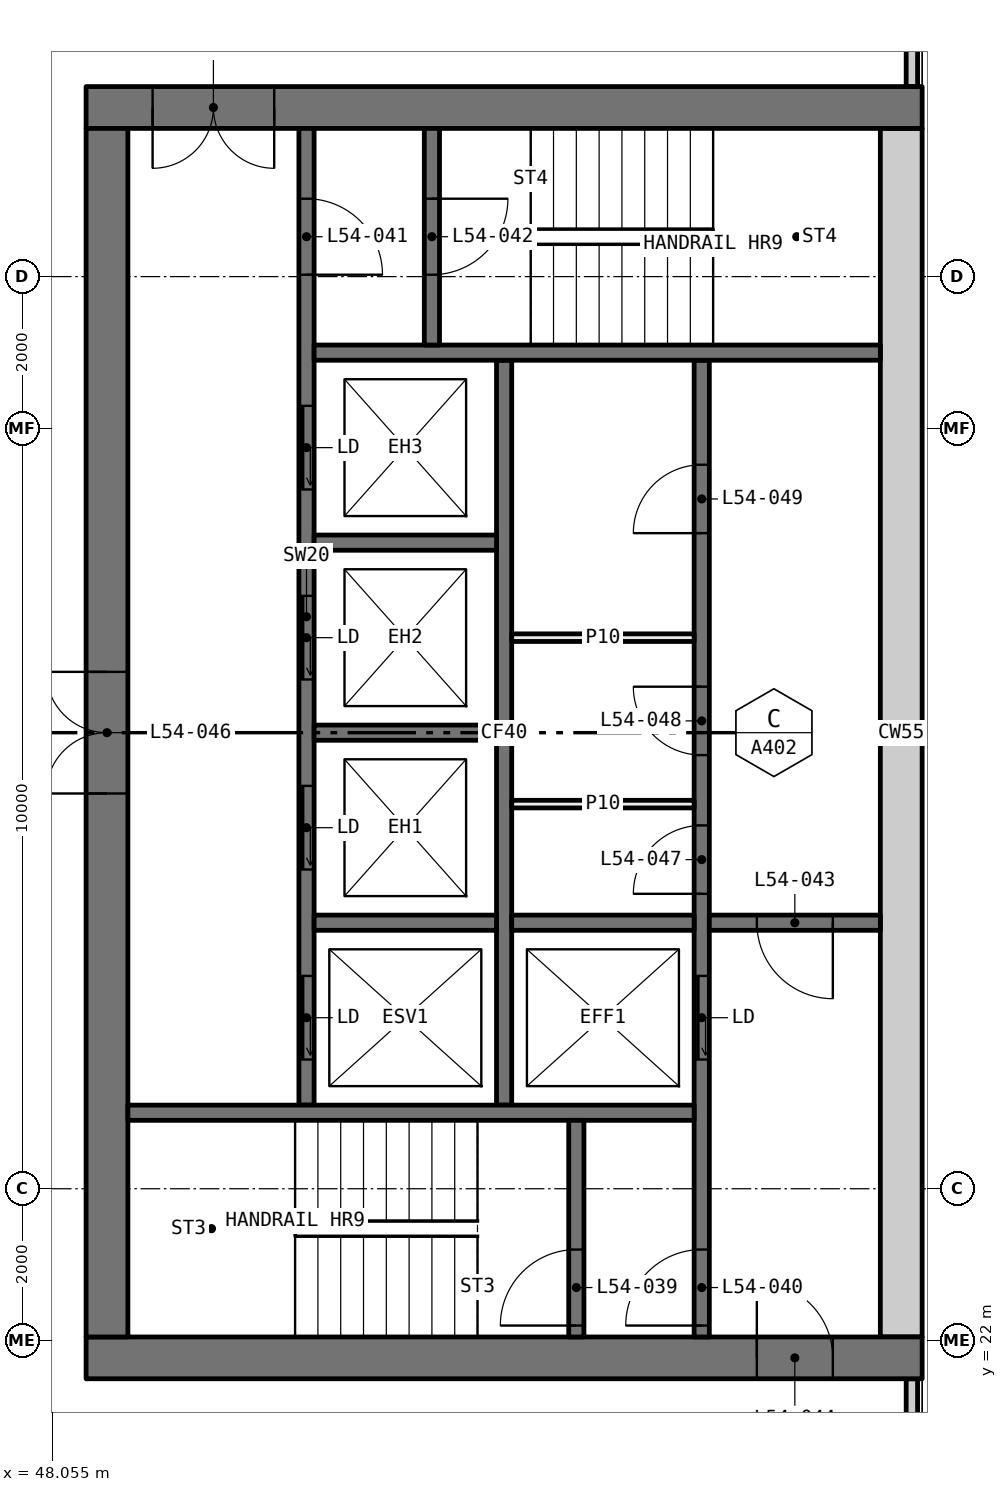
"""IFC4 building model, lengths in metres.
Left out: names, types, materials, properties, quantities, classifications, styles, units other than length and angle.
Written with IfcOpenShell. Run it as: python <this file> out.ifc"""

import sys

from ifc_helpers import new_model, si_unit, direction, frame, frame_2d, origin, place, context, subcontext, project, spatial, rectangle, extrude, element, fill, save


model = new_model("IFC4")
c1 = context("Model", 3, precision=1e-05, world=origin(), true_north=direction((0.0, 1.0)))
c2 = subcontext(c1, "Body", "Model", "MODEL_VIEW")
j1 = project(units=[si_unit("LENGTHUNIT", "METRE"), si_unit("PLANEANGLEUNIT", "RADIAN")], contexts=[c1])
p1 = place(None, origin())
s1 = spatial("IfcSite", under=j1, at=p1, CompositionType="ELEMENT")
p2 = place(p1, origin())
s2 = spatial("IfcBuilding", under=s1, at=p2, CompositionType="ELEMENT")
p3 = place(p2, frame((0.0, 0.0, 203.1)))
s3 = spatial("IfcBuildingStorey", under=s2, at=p3, CompositionType="ELEMENT", Elevation=203.1)
for number, where, z_axis, x_axis in (
    (1, (59.365, 18.71, 0.0), (0.0, 0.0, 1.0), (0.0, 1.0, 0.0)),
    (2, (59.365, 38.5, 0.0), (0.0, 0.0, 1.0), (0.0, 1.0, 0.0)),
):
    element("IfcWall", number, at=place(p3, frame(where, z_axis=z_axis, x_axis=x_axis)), inside=s3, PredefinedType="ELEMENTEDWALL", context=c2, shape_type="SweptSolid", body=[
        extrude(rectangle(XDim=2.79, YDim=0.15, at=frame_2d((1.395, 0.0))), origin(), (0.0, 0.0, 1.0), 3.05),
    ])
p4 = place(p3, frame((59.5, 21.775, 0.0), z_axis=(0.0, 0.0, 1.0), x_axis=(-1.0, 0.0, 0.0)))
e3 = element("IfcWall", 3, at=p4, inside=s3, PredefinedType="SHEAR", context=c2, shape_type="SweptSolid", body=[
    extrude(rectangle(XDim=11.0, YDim=0.55, at=frame_2d((5.5, 0.0))), origin(), (0.0, 0.0, 1.0), 3.05),
])
p5 = place(p4, frame((1.175, 0.0, 0.0)))
e4 = element("IfcOpeningElement", 4, at=p5, cuts=e3, PredefinedType="OPENING", context=c2, shape_type="SweptSolid", body=[
    extrude(rectangle(XDim=1.0, YDim=2.1, at=frame_2d((0.5, 1.05))), frame((0.0, 0.285, 0.0), z_axis=(0.0, -1.0, 0.0), x_axis=(1.0, 0.0, 0.0)), (0.0, 0.0, 1.0), 0.57),
])
p6 = place(p3, frame((59.5, 38.225, 0.0), z_axis=(0.0, 0.0, 1.0), x_axis=(-1.0, 0.0, 0.0)))
e5 = element("IfcWall", 5, at=p6, inside=s3, PredefinedType="SHEAR", context=c2, shape_type="SweptSolid", body=[
    extrude(rectangle(XDim=11.0, YDim=0.55, at=frame_2d((5.5, 0.0))), origin(), (0.0, 0.0, 1.0), 3.05),
])
p7 = place(p6, frame((8.525, 0.0, 0.0)))
e6 = element("IfcOpeningElement", 6, at=p7, cuts=e5, PredefinedType="OPENING", context=c2, shape_type="SweptSolid", body=[
    extrude(rectangle(XDim=1.6, YDim=2.1, at=frame_2d((0.8, 1.05))), frame((0.0, 0.285, 0.0), z_axis=(0.0, -1.0, 0.0), x_axis=(1.0, 0.0, 0.0)), (0.0, 0.0, 1.0), 0.57),
])
p8 = place(p3, frame((59.225, 22.05, 0.0), z_axis=(0.0, 0.0, 1.0), x_axis=(0.0, 1.0, 0.0)))
e7 = element("IfcWall", 7, at=p8, inside=s3, PredefinedType="SHEAR", context=c2, shape_type="SweptSolid", body=[
    extrude(rectangle(XDim=15.9, YDim=0.55, at=frame_2d((7.95, 0.0))), origin(), (0.0, 0.0, 1.0), 3.05),
])
p9 = place(p3, frame((48.775, 22.05, 0.0), z_axis=(0.0, 0.0, 1.0), x_axis=(0.0, 1.0, 0.0)))
e8 = element("IfcWall", 8, at=p9, inside=s3, PredefinedType="SHEAR", context=c2, shape_type="SweptSolid", body=[
    extrude(rectangle(XDim=15.9, YDim=0.55, at=frame_2d((7.95, 0.0))), origin(), (0.0, 0.0, 1.0), 3.05),
])
p10 = place(p9, frame((7.15, 0.0, 0.0)))
e9 = element("IfcOpeningElement", 9, at=p10, cuts=e8, PredefinedType="OPENING", context=c2, shape_type="SweptSolid", body=[
    extrude(rectangle(XDim=1.6, YDim=2.1, at=frame_2d((0.8, 1.05))), frame((0.0, 0.285, 0.0), z_axis=(0.0, -1.0, 0.0), x_axis=(1.0, 0.0, 0.0)), (0.0, 0.0, 1.0), 0.57),
])
p11 = place(p3, frame((56.6, 22.05, 0.0), z_axis=(0.0, 0.0, 1.0), x_axis=(0.0, 1.0, 0.0)))
e10 = element("IfcWall", 10, at=p11, inside=s3, PredefinedType="SOLIDWALL", context=c2, shape_type="SweptSolid", body=[
    extrude(rectangle(XDim=12.85, YDim=0.2, at=frame_2d((6.425, 0.0))), origin(), (0.0, 0.0, 1.0), 3.05),
])
p12 = place(p11, frame((3.65, 0.0, 0.0)))
e11 = element("IfcOpeningElement", 11, at=p12, cuts=e10, PredefinedType="OPENING", context=c2, shape_type="SweptSolid", body=[
    extrude(rectangle(XDim=1.1, YDim=2.1, at=frame_2d((0.55, 1.05))), frame((0.0, 0.11, 0.0), z_axis=(0.0, -1.0, 0.0), x_axis=(1.0, 0.0, 0.0)), (0.0, 0.0, 1.0), 0.22),
])
p13 = place(p11, frame((0.15, 0.0, 0.0)))
e12 = element("IfcOpeningElement", 12, at=p13, cuts=e10, PredefinedType="OPENING", context=c2, shape_type="SweptSolid", body=[
    extrude(rectangle(XDim=1.0, YDim=2.1, at=frame_2d((0.5, 1.05))), frame((0.0, 0.11, 0.0), z_axis=(0.0, -1.0, 0.0), x_axis=(1.0, 0.0, 0.0)), (0.0, 0.0, 1.0), 0.22),
])
p14 = place(p11, frame((5.83, 0.0, 0.0)))
e13 = element("IfcOpeningElement", 13, at=p14, cuts=e10, PredefinedType="OPENING", context=c2, shape_type="SweptSolid", body=[
    extrude(rectangle(XDim=0.9, YDim=2.1, at=frame_2d((0.45, 1.05))), frame((0.0, 0.11, 0.0), z_axis=(0.0, -1.0, 0.0), x_axis=(1.0, 0.0, 0.0)), (0.0, 0.0, 1.0), 0.22),
])
p15 = place(p11, frame((7.655, 0.0, 0.0)))
e14 = element("IfcOpeningElement", 14, at=p15, cuts=e10, PredefinedType="OPENING", context=c2, shape_type="SweptSolid", body=[
    extrude(rectangle(XDim=0.9, YDim=2.1, at=frame_2d((0.45, 1.05))), frame((0.0, 0.11, 0.0), z_axis=(0.0, -1.0, 0.0), x_axis=(1.0, 0.0, 0.0)), (0.0, 0.0, 1.0), 0.22),
])
p16 = place(p11, frame((10.575, 0.0, 0.0)))
e15 = element("IfcOpeningElement", 15, at=p16, cuts=e10, PredefinedType="OPENING", context=c2, shape_type="SweptSolid", body=[
    extrude(rectangle(XDim=0.9, YDim=2.1, at=frame_2d((0.45, 1.05))), frame((0.0, 0.11, 0.0), z_axis=(0.0, -1.0, 0.0), x_axis=(1.0, 0.0, 0.0)), (0.0, 0.0, 1.0), 0.22),
])
p17 = place(p3, frame((51.4, 25.1, 0.0), z_axis=(0.0, 0.0, 1.0), x_axis=(0.0, 1.0, 0.0)))
e16 = element("IfcWall", 16, at=p17, inside=s3, PredefinedType="SOLIDWALL", context=c2, shape_type="SweptSolid", body=[
    extrude(rectangle(XDim=12.85, YDim=0.2, at=frame_2d((6.425, 0.0))), origin(), (0.0, 0.0, 1.0), 3.05),
])
p18 = place(p17, frame((0.6, 0.0, 0.0)))
e17 = element("IfcOpeningElement", 17, at=p18, cuts=e16, PredefinedType="OPENING", context=c2, shape_type="SweptSolid", body=[
    extrude(rectangle(XDim=1.1, YDim=2.1, at=frame_2d((0.55, 1.05))), frame((0.0, 0.11, 0.0), z_axis=(0.0, -1.0, 0.0), x_axis=(1.0, 0.0, 0.0)), (0.0, 0.0, 1.0), 0.22),
])
p19 = place(p17, frame((3.1, 0.0, 0.0)))
e18 = element("IfcOpeningElement", 18, at=p19, cuts=e16, PredefinedType="OPENING", context=c2, shape_type="SweptSolid", body=[
    extrude(rectangle(XDim=1.1, YDim=2.1, at=frame_2d((0.55, 1.05))), frame((0.0, 0.11, 0.0), z_axis=(0.0, -1.0, 0.0), x_axis=(1.0, 0.0, 0.0)), (0.0, 0.0, 1.0), 0.22),
])
p20 = place(p17, frame((5.6, 0.0, 0.0)))
e19 = element("IfcOpeningElement", 19, at=p20, cuts=e16, PredefinedType="OPENING", context=c2, shape_type="SweptSolid", body=[
    extrude(rectangle(XDim=1.1, YDim=2.1, at=frame_2d((0.55, 1.05))), frame((0.0, 0.11, 0.0), z_axis=(0.0, -1.0, 0.0), x_axis=(1.0, 0.0, 0.0)), (0.0, 0.0, 1.0), 0.22),
])
p21 = place(p17, frame((8.1, 0.0, 0.0)))
e20 = element("IfcOpeningElement", 20, at=p21, cuts=e16, PredefinedType="OPENING", context=c2, shape_type="SweptSolid", body=[
    extrude(rectangle(XDim=1.1, YDim=2.1, at=frame_2d((0.55, 1.05))), frame((0.0, 0.11, 0.0), z_axis=(0.0, -1.0, 0.0), x_axis=(1.0, 0.0, 0.0)), (0.0, 0.0, 1.0), 0.22),
])
p22 = place(p17, frame((10.925, 0.0, 0.0)))
e21 = element("IfcOpeningElement", 21, at=p22, cuts=e16, PredefinedType="OPENING", context=c2, shape_type="SweptSolid", body=[
    extrude(rectangle(XDim=1.0, YDim=2.1, at=frame_2d((0.5, 1.05))), frame((0.0, 0.11, 0.0), z_axis=(0.0, -1.0, 0.0), x_axis=(1.0, 0.0, 0.0)), (0.0, 0.0, 1.0), 0.22),
])
p23 = place(p3, frame((54.0, 25.1, 0.0), z_axis=(0.0, 0.0, 1.0), x_axis=(0.0, 1.0, 0.0)))
e22 = element("IfcWall", 22, at=p23, inside=s3, PredefinedType="SOLIDWALL", context=c2, shape_type="SweptSolid", body=[
    extrude(rectangle(XDim=9.8, YDim=0.2, at=frame_2d((4.9, 0.0))), origin(), (0.0, 0.0, 1.0), 3.05),
])
for number, where, z_axis, x_axis in (
    (23, (56.5, 25.0, 0.0), (0.0, 0.0, 1.0), (-1.0, 0.0, 0.0)),
    (24, (58.95, 35.0, 0.0), (0.0, 0.0, 1.0), (-1.0, 0.0, 0.0)),
):
    element("IfcWall", number, at=place(p3, frame(where, z_axis=z_axis, x_axis=x_axis)), inside=s3, PredefinedType="SOLIDWALL", context=c2, shape_type="SweptSolid", body=[
        extrude(rectangle(XDim=7.45, YDim=0.2, at=frame_2d((3.725, 0.0))), origin(), (0.0, 0.0, 1.0), 3.05),
    ])
p24 = place(p3, frame((58.95, 27.5, 0.0), z_axis=(0.0, 0.0, 1.0), x_axis=(-1.0, 0.0, 0.0)))
e25 = element("IfcWall", 25, at=p24, inside=s3, PredefinedType="SOLIDWALL", context=c2, shape_type="SweptSolid", body=[
    extrude(rectangle(XDim=2.25, YDim=0.2, at=frame_2d((1.125, 0.0))), origin(), (0.0, 0.0, 1.0), 3.05),
])
p25 = place(p24, frame((0.625, 0.0, 0.0)))
e26 = element("IfcOpeningElement", 26, at=p25, cuts=e25, PredefinedType="OPENING", context=c2, shape_type="SweptSolid", body=[
    extrude(rectangle(XDim=1.0, YDim=2.1, at=frame_2d((0.5, 1.05))), frame((0.0, 0.11, 0.0), z_axis=(0.0, -1.0, 0.0), x_axis=(1.0, 0.0, 0.0)), (0.0, 0.0, 1.0), 0.22),
])
p26 = place(p3, frame((54.95, 22.05, 0.0), z_axis=(0.0, 0.0, 1.0), x_axis=(0.0, 1.0, 0.0)))
e27 = element("IfcWall", 27, at=p26, inside=s3, PredefinedType="SOLIDWALL", context=c2, shape_type="SweptSolid", body=[
    extrude(rectangle(XDim=2.85, YDim=0.2, at=frame_2d((1.425, 0.0))), origin(), (0.0, 0.0, 1.0), 3.05),
])
p27 = place(p26, frame((0.15, 0.0, 0.0)))
e28 = element("IfcOpeningElement", 28, at=p27, cuts=e27, PredefinedType="OPENING", context=c2, shape_type="SweptSolid", body=[
    extrude(rectangle(XDim=1.0, YDim=2.1, at=frame_2d((0.5, 1.05))), frame((0.0, 0.11, 0.0), z_axis=(0.0, -1.0, 0.0), x_axis=(1.0, 0.0, 0.0)), (0.0, 0.0, 1.0), 0.22),
])
p28 = place(p3, frame((53.05, 35.1, 0.0), z_axis=(0.0, 0.0, 1.0), x_axis=(0.0, 1.0, 0.0)))
e29 = element("IfcWall", 29, at=p28, inside=s3, PredefinedType="SOLIDWALL", context=c2, shape_type="SweptSolid", body=[
    extrude(rectangle(XDim=2.85, YDim=0.2, at=frame_2d((1.425, 0.0))), origin(), (0.0, 0.0, 1.0), 3.05),
])
p29 = place(p28, frame((0.925, 0.0, 0.0)))
e30 = element("IfcOpeningElement", 30, at=p29, cuts=e29, PredefinedType="OPENING", context=c2, shape_type="SweptSolid", body=[
    extrude(rectangle(XDim=1.0, YDim=2.1, at=frame_2d((0.5, 1.05))), frame((0.0, 0.11, 0.0), z_axis=(0.0, -1.0, 0.0), x_axis=(1.0, 0.0, 0.0)), (0.0, 0.0, 1.0), 0.22),
])
for number, where, z_axis, x_axis in (
    (31, (56.5, 27.5, 0.0), (0.0, 0.0, 1.0), (-1.0, 0.0, 0.0)),
    (32, (53.9, 27.5, 0.0), (0.0, 0.0, 1.0), (-1.0, 0.0, 0.0)),
    (33, (53.9, 30.0, 0.0), (0.0, 0.0, 1.0), (-1.0, 0.0, 0.0)),
    (34, (53.9, 32.5, 0.0), (0.0, 0.0, 1.0), (-1.0, 0.0, 0.0)),
):
    element("IfcWall", number, at=place(p3, frame(where, z_axis=z_axis, x_axis=x_axis)), inside=s3, PredefinedType="SOLIDWALL", context=c2, shape_type="SweptSolid", body=[
        extrude(rectangle(XDim=2.4, YDim=0.2, at=frame_2d((1.2, 0.0))), origin(), (0.0, 0.0, 1.0), 3.05),
    ])
for number, where, z_axis, x_axis in (
    (35, (56.5, 29.06, 0.0), (0.0, 0.0, 1.0), (-1.0, 0.0, 0.0)),
    (36, (56.5, 31.25, 0.0), (0.0, 0.0, 1.0), (-1.0, 0.0, 0.0)),
):
    element("IfcWall", number, at=place(p3, frame(where, z_axis=z_axis, x_axis=x_axis)), inside=s3, PredefinedType="PARTITIONING", context=c2, shape_type="SweptSolid", body=[
        extrude(rectangle(XDim=2.4, YDim=0.1, at=frame_2d((1.2, 0.0))), origin(), (0.0, 0.0, 1.0), 3.05),
    ])
p30 = place(p18, origin())
e37 = element("IfcDoor", 37, at=p30, inside=s3, OperationType="SLIDING_TO_LEFT", PredefinedType="DOOR", context=c2, shape_type="SweptSolid", body=[
    extrude(rectangle(XDim=1.1, YDim=2.1, at=frame_2d((0.55, 1.05))), frame((0.0, 0.025, 0.0), z_axis=(0.0, -1.0, 0.0), x_axis=(1.0, 0.0, 0.0)), (0.0, 0.0, 1.0), 0.05),
])
fill(e17, e37)
p31 = place(p19, origin())
e38 = element("IfcDoor", 38, at=p31, inside=s3, OperationType="SLIDING_TO_LEFT", PredefinedType="DOOR", context=c2, shape_type="SweptSolid", body=[
    extrude(rectangle(XDim=1.1, YDim=2.1, at=frame_2d((0.55, 1.05))), frame((0.0, 0.025, 0.0), z_axis=(0.0, -1.0, 0.0), x_axis=(1.0, 0.0, 0.0)), (0.0, 0.0, 1.0), 0.05),
])
fill(e18, e38)
p32 = place(p20, origin())
e39 = element("IfcDoor", 39, at=p32, inside=s3, OperationType="SLIDING_TO_LEFT", PredefinedType="DOOR", context=c2, shape_type="SweptSolid", body=[
    extrude(rectangle(XDim=1.1, YDim=2.1, at=frame_2d((0.55, 1.05))), frame((0.0, 0.025, 0.0), z_axis=(0.0, -1.0, 0.0), x_axis=(1.0, 0.0, 0.0)), (0.0, 0.0, 1.0), 0.05),
])
fill(e19, e39)
p33 = place(p21, origin())
e40 = element("IfcDoor", 40, at=p33, inside=s3, OperationType="SLIDING_TO_LEFT", PredefinedType="DOOR", context=c2, shape_type="SweptSolid", body=[
    extrude(rectangle(XDim=1.1, YDim=2.1, at=frame_2d((0.55, 1.05))), frame((0.0, 0.025, 0.0), z_axis=(0.0, -1.0, 0.0), x_axis=(1.0, 0.0, 0.0)), (0.0, 0.0, 1.0), 0.05),
])
fill(e20, e40)
p34 = place(p12, origin())
e41 = element("IfcDoor", 41, at=p34, inside=s3, OperationType="SLIDING_TO_LEFT", PredefinedType="DOOR", context=c2, shape_type="SweptSolid", body=[
    extrude(rectangle(XDim=1.1, YDim=2.1, at=frame_2d((0.55, 1.05))), frame((0.0, 0.025, 0.0), z_axis=(0.0, -1.0, 0.0), x_axis=(1.0, 0.0, 0.0)), (0.0, 0.0, 1.0), 0.05),
])
fill(e11, e41)
p35 = place(p27, origin())
e42 = element("IfcDoor", 42, at=p35, inside=s3, OperationType="SINGLE_SWING_RIGHT", PredefinedType="DOOR", context=c2, shape_type="SweptSolid", body=[
    extrude(rectangle(XDim=1.0, YDim=2.1, at=frame_2d((0.5, 1.05))), frame((0.0, 0.025, 0.0), z_axis=(0.0, -1.0, 0.0), x_axis=(1.0, 0.0, 0.0)), (0.0, 0.0, 1.0), 0.05),
])
fill(e28, e42)
p36 = place(p13, origin())
e43 = element("IfcDoor", 43, at=p36, inside=s3, OperationType="SINGLE_SWING_RIGHT", PredefinedType="DOOR", context=c2, shape_type="SweptSolid", body=[
    extrude(rectangle(XDim=1.0, YDim=2.1, at=frame_2d((0.5, 1.05))), frame((0.0, 0.025, 0.0), z_axis=(0.0, -1.0, 0.0), x_axis=(1.0, 0.0, 0.0)), (0.0, 0.0, 1.0), 0.05),
])
fill(e12, e43)
p37 = place(p22, frame((1.0, 0.0, 0.0), x_axis=(-1.0, 0.0, 0.0)))
e44 = element("IfcDoor", 44, at=p37, inside=s3, OperationType="SINGLE_SWING_LEFT", PredefinedType="DOOR", context=c2, shape_type="SweptSolid", body=[
    extrude(rectangle(XDim=1.0, YDim=2.1, at=frame_2d((0.5, 1.05))), frame((0.0, 0.025, 0.0), z_axis=(0.0, -1.0, 0.0), x_axis=(1.0, 0.0, 0.0)), (0.0, 0.0, 1.0), 0.05),
])
fill(e21, e44)
p38 = place(p29, frame((1.0, 0.0, 0.0), x_axis=(-1.0, 0.0, 0.0)))
e45 = element("IfcDoor", 45, at=p38, inside=s3, OperationType="SINGLE_SWING_RIGHT", PredefinedType="DOOR", context=c2, shape_type="SweptSolid", body=[
    extrude(rectangle(XDim=1.0, YDim=2.1, at=frame_2d((0.5, 1.05))), frame((0.0, 0.025, 0.0), z_axis=(0.0, -1.0, 0.0), x_axis=(1.0, 0.0, 0.0)), (0.0, 0.0, 1.0), 0.05),
])
fill(e30, e45)
p39 = place(p25, origin())
e46 = element("IfcDoor", 46, at=p39, inside=s3, OperationType="SINGLE_SWING_RIGHT", PredefinedType="DOOR", context=c2, shape_type="SweptSolid", body=[
    extrude(rectangle(XDim=1.0, YDim=2.1, at=frame_2d((0.5, 1.05))), frame((0.0, 0.025, 0.0), z_axis=(0.0, -1.0, 0.0), x_axis=(1.0, 0.0, 0.0)), (0.0, 0.0, 1.0), 0.05),
])
fill(e26, e46)
p40 = place(p5, frame((1.0, 0.0, 0.0), x_axis=(-1.0, 0.0, 0.0)))
e47 = element("IfcDoor", 47, at=p40, inside=s3, OperationType="SINGLE_SWING_RIGHT", PredefinedType="DOOR", context=c2, shape_type="SweptSolid", body=[
    extrude(rectangle(XDim=1.0, YDim=2.1, at=frame_2d((0.5, 1.05))), frame((0.0, 0.025, 0.0), z_axis=(0.0, -1.0, 0.0), x_axis=(1.0, 0.0, 0.0)), (0.0, 0.0, 1.0), 0.05),
])
fill(e4, e47)
p41 = place(p7, origin())
e48 = element("IfcDoor", 48, at=p41, inside=s3, OperationType="DOUBLE_DOOR_SINGLE_SWING", PredefinedType="DOOR", context=c2, shape_type="SweptSolid", body=[
    extrude(rectangle(XDim=1.6, YDim=2.1, at=frame_2d((0.8, 1.05))), frame((0.0, 0.025, 0.0), z_axis=(0.0, -1.0, 0.0), x_axis=(1.0, 0.0, 0.0)), (0.0, 0.0, 1.0), 0.05),
])
fill(e6, e48)
p42 = place(p10, origin())
e49 = element("IfcDoor", 49, at=p42, inside=s3, OperationType="DOUBLE_DOOR_SINGLE_SWING", PredefinedType="DOOR", context=c2, shape_type="SweptSolid", body=[
    extrude(rectangle(XDim=1.6, YDim=2.1, at=frame_2d((0.8, 1.05))), frame((0.0, 0.025, 0.0), z_axis=(0.0, -1.0, 0.0), x_axis=(1.0, 0.0, 0.0)), (0.0, 0.0, 1.0), 0.05),
])
fill(e9, e49)
p43 = place(p14, origin())
e50 = element("IfcDoor", 50, at=p43, inside=s3, OperationType="SINGLE_SWING_RIGHT", PredefinedType="DOOR", context=c2, shape_type="SweptSolid", body=[
    extrude(rectangle(XDim=0.9, YDim=2.1, at=frame_2d((0.45, 1.05))), frame((0.0, 0.025, 0.0), z_axis=(0.0, -1.0, 0.0), x_axis=(1.0, 0.0, 0.0)), (0.0, 0.0, 1.0), 0.05),
])
fill(e13, e50)
p44 = place(p15, origin())
e51 = element("IfcDoor", 51, at=p44, inside=s3, OperationType="SINGLE_SWING_LEFT", PredefinedType="DOOR", context=c2, shape_type="SweptSolid", body=[
    extrude(rectangle(XDim=0.9, YDim=2.1, at=frame_2d((0.45, 1.05))), frame((0.0, 0.025, 0.0), z_axis=(0.0, -1.0, 0.0), x_axis=(1.0, 0.0, 0.0)), (0.0, 0.0, 1.0), 0.05),
])
fill(e14, e51)
p45 = place(p16, origin())
e52 = element("IfcDoor", 52, at=p45, inside=s3, OperationType="SINGLE_SWING_RIGHT", PredefinedType="DOOR", context=c2, shape_type="SweptSolid", body=[
    extrude(rectangle(XDim=0.9, YDim=2.1, at=frame_2d((0.45, 1.05))), frame((0.0, 0.025, 0.0), z_axis=(0.0, -1.0, 0.0), x_axis=(1.0, 0.0, 0.0)), (0.0, 0.0, 1.0), 0.05),
])
fill(e15, e52)
save(model, sys.argv[1])
